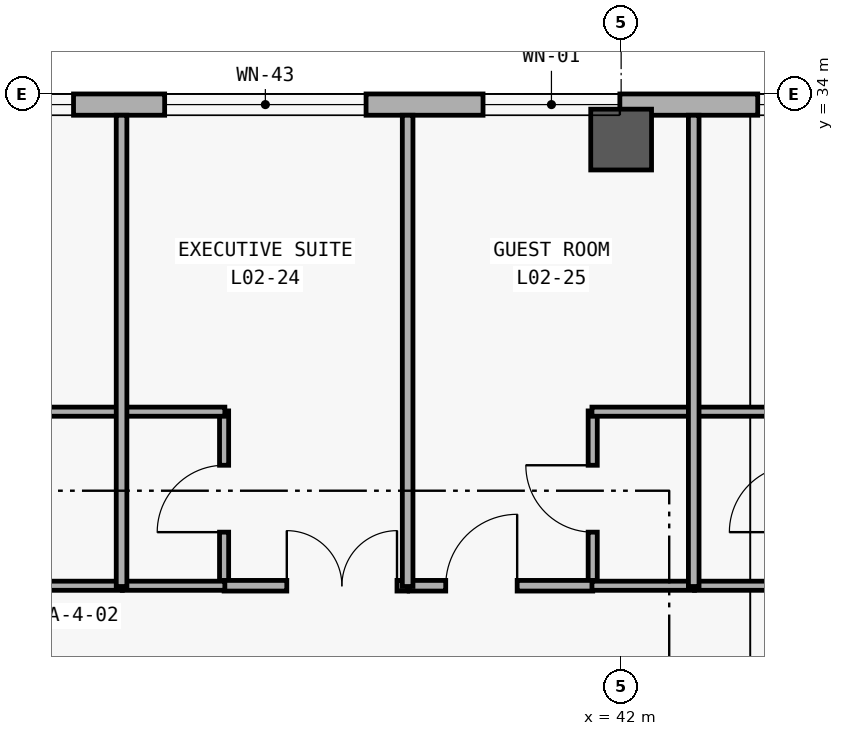
"""IFC4 building model, lengths in metres.
Left out: names, types, materials, properties, quantities, classifications, styles, units other than length and angle.
Written with IfcOpenShell. Run it as: python <this file> out.ifc"""

import sys

from ifc_helpers import new_model, si_unit, direction, frame, frame_2d, origin, origin_2d, place, context, subcontext, project, spatial, rectangle, extrude, element, fill, save


model = new_model("IFC4")
c1 = context("Model", 3, precision=1e-05, world=origin(), true_north=direction((0.0, 1.0)))
c2 = subcontext(c1, "Body", "Model", "MODEL_VIEW")
j1 = project(units=[si_unit("LENGTHUNIT", "METRE"), si_unit("PLANEANGLEUNIT", "RADIAN")], contexts=[c1])
p1 = place(None, origin())
s1 = spatial("IfcSite", under=j1, at=p1, CompositionType="ELEMENT")
p2 = place(p1, origin())
s2 = spatial("IfcBuilding", under=s1, at=p2, CompositionType="ELEMENT")
p3 = place(p2, frame((0.0, 0.0, 10.8)))
s3 = spatial("IfcBuildingStorey", under=s2, at=p3, CompositionType="ELEMENT", Elevation=10.8)
p4 = place(p3, frame((42.0, 33.4, 0.0), z_axis=(0.0, 0.0, 1.0), x_axis=(1.0, 0.0, 0.0)))
e1 = element("IfcColumn", 1, at=p4, inside=s3, PredefinedType="COLUMN", context=c2, shape_type="SweptSolid", body=[
    extrude(rectangle(XDim=0.8, YDim=0.8, at=origin_2d()), origin(), (0.0, 0.0, 1.0), 4.2),
])
p5 = place(p3, frame((8.68, 33.86, 0.0), z_axis=(0.0, 0.0, 1.0), x_axis=(1.0, 0.0, 0.0)))
e2 = element("IfcWall", 2, at=p5, inside=s3, PredefinedType="SOLIDWALL", context=c2, shape_type="SweptSolid", body=[
    extrude(rectangle(XDim=83.44, YDim=0.28, at=frame_2d((41.72, 0.0))), origin(), (0.0, 0.0, 1.0), 3.92),
])
p6 = place(p5, frame((5.07, 0.0, 0.85)))
e3 = element("IfcOpeningElement", 3, at=p6, cuts=e2, PredefinedType="OPENING", context=c2, shape_type="SweptSolid", body=[
    extrude(rectangle(XDim=1.7, YDim=2.0, at=frame_2d((0.85, 1.0))), frame((0.0, 0.15, 0.0), z_axis=(0.0, -1.0, 0.0), x_axis=(1.0, 0.0, 0.0)), (0.0, 0.0, 1.0), 0.3),
])
p7 = place(p5, frame((12.557, 0.0, 0.85)))
e4 = element("IfcOpeningElement", 4, at=p7, cuts=e2, PredefinedType="OPENING", context=c2, shape_type="SweptSolid", body=[
    extrude(rectangle(XDim=2.05, YDim=1.95, at=frame_2d((1.025, 0.975))), frame((0.0, 0.15, 0.0), z_axis=(0.0, -1.0, 0.0), x_axis=(1.0, 0.0, 0.0)), (0.0, 0.0, 1.0), 0.3),
])
p8 = place(p5, frame((16.256, 0.0, 0.85)))
e5 = element("IfcOpeningElement", 5, at=p8, cuts=e2, PredefinedType="OPENING", context=c2, shape_type="SweptSolid", body=[
    extrude(rectangle(XDim=2.18, YDim=1.95, at=frame_2d((1.09, 0.975))), frame((0.0, 0.15, 0.0), z_axis=(0.0, -1.0, 0.0), x_axis=(1.0, 0.0, 0.0)), (0.0, 0.0, 1.0), 0.3),
])
p9 = place(p5, frame((19.921, 0.0, 0.85)))
e6 = element("IfcOpeningElement", 6, at=p9, cuts=e2, PredefinedType="OPENING", context=c2, shape_type="SweptSolid", body=[
    extrude(rectangle(XDim=2.38, YDim=1.95, at=frame_2d((1.19, 0.975))), frame((0.0, 0.15, 0.0), z_axis=(0.0, -1.0, 0.0), x_axis=(1.0, 0.0, 0.0)), (0.0, 0.0, 1.0), 0.3),
])
p10 = place(p5, frame((23.635, 0.0, 0.85)))
e7 = element("IfcOpeningElement", 7, at=p10, cuts=e2, PredefinedType="OPENING", context=c2, shape_type="SweptSolid", body=[
    extrude(rectangle(XDim=2.48, YDim=2.0, at=frame_2d((1.24, 1.0))), frame((0.0, 0.15, 0.0), z_axis=(0.0, -1.0, 0.0), x_axis=(1.0, 0.0, 0.0)), (0.0, 0.0, 1.0), 0.3),
])
p11 = place(p5, frame((27.314, 0.0, 0.85)))
e8 = element("IfcOpeningElement", 8, at=p11, cuts=e2, PredefinedType="OPENING", context=c2, shape_type="SweptSolid", body=[
    extrude(rectangle(XDim=2.65, YDim=2.0, at=frame_2d((1.325, 1.0))), frame((0.0, 0.15, 0.0), z_axis=(0.0, -1.0, 0.0), x_axis=(1.0, 0.0, 0.0)), (0.0, 0.0, 1.0), 0.3),
])
p12 = place(p5, frame((31.503, 0.0, 0.85)))
e9 = element("IfcOpeningElement", 9, at=p12, cuts=e2, PredefinedType="OPENING", context=c2, shape_type="SweptSolid", body=[
    extrude(rectangle(XDim=1.8, YDim=1.8, at=frame_2d((0.9, 0.9))), frame((0.0, 0.15, 0.0), z_axis=(0.0, -1.0, 0.0), x_axis=(1.0, 0.0, 0.0)), (0.0, 0.0, 1.0), 0.3),
])
p13 = place(p5, frame((35.117, 0.0, 0.85)))
e10 = element("IfcOpeningElement", 10, at=p13, cuts=e2, PredefinedType="OPENING", context=c2, shape_type="SweptSolid", body=[
    extrude(rectangle(XDim=2.1, YDim=1.8, at=frame_2d((1.05, 0.9))), frame((0.0, 0.15, 0.0), z_axis=(0.0, -1.0, 0.0), x_axis=(1.0, 0.0, 0.0)), (0.0, 0.0, 1.0), 0.3),
])
p14 = place(p5, frame((38.731, 0.0, 0.85)))
e11 = element("IfcOpeningElement", 11, at=p14, cuts=e2, PredefinedType="OPENING", context=c2, shape_type="SweptSolid", body=[
    extrude(rectangle(XDim=2.4, YDim=1.8, at=frame_2d((1.2, 0.9))), frame((0.0, 0.15, 0.0), z_axis=(0.0, -1.0, 0.0), x_axis=(1.0, 0.0, 0.0)), (0.0, 0.0, 1.0), 0.3),
])
p15 = place(p5, frame((42.346, 0.0, 0.85)))
e12 = element("IfcOpeningElement", 12, at=p15, cuts=e2, PredefinedType="OPENING", context=c2, shape_type="SweptSolid", body=[
    extrude(rectangle(XDim=2.7, YDim=1.85, at=frame_2d((1.35, 0.925))), frame((0.0, 0.15, 0.0), z_axis=(0.0, -1.0, 0.0), x_axis=(1.0, 0.0, 0.0)), (0.0, 0.0, 1.0), 0.3),
])
p16 = place(p5, frame((46.71, 0.0, 0.85)))
e13 = element("IfcOpeningElement", 13, at=p16, cuts=e2, PredefinedType="OPENING", context=c2, shape_type="SweptSolid", body=[
    extrude(rectangle(XDim=1.5, YDim=1.75, at=frame_2d((0.75, 0.875))), frame((0.0, 0.15, 0.0), z_axis=(0.0, -1.0, 0.0), x_axis=(1.0, 0.0, 0.0)), (0.0, 0.0, 1.0), 0.3),
])
p17 = place(p5, frame((50.399, 0.0, 0.85)))
e14 = element("IfcOpeningElement", 14, at=p17, cuts=e2, PredefinedType="OPENING", context=c2, shape_type="SweptSolid", body=[
    extrude(rectangle(XDim=1.65, YDim=1.75, at=frame_2d((0.825, 0.875))), frame((0.0, 0.15, 0.0), z_axis=(0.0, -1.0, 0.0), x_axis=(1.0, 0.0, 0.0)), (0.0, 0.0, 1.0), 0.3),
])
p18 = place(p5, frame((54.014, 0.0, 0.85)))
e15 = element("IfcOpeningElement", 15, at=p18, cuts=e2, PredefinedType="OPENING", context=c2, shape_type="SweptSolid", body=[
    extrude(rectangle(XDim=1.95, YDim=1.75, at=frame_2d((0.975, 0.875))), frame((0.0, 0.15, 0.0), z_axis=(0.0, -1.0, 0.0), x_axis=(1.0, 0.0, 0.0)), (0.0, 0.0, 1.0), 0.3),
])
p19 = place(p5, frame((57.628, 0.0, 0.85)))
e16 = element("IfcOpeningElement", 16, at=p19, cuts=e2, PredefinedType="OPENING", context=c2, shape_type="SweptSolid", body=[
    extrude(rectangle(XDim=2.25, YDim=1.75, at=frame_2d((1.125, 0.875))), frame((0.0, 0.15, 0.0), z_axis=(0.0, -1.0, 0.0), x_axis=(1.0, 0.0, 0.0)), (0.0, 0.0, 1.0), 0.3),
])
p20 = place(p5, frame((61.242, 0.0, 0.85)))
e17 = element("IfcOpeningElement", 17, at=p20, cuts=e2, PredefinedType="OPENING", context=c2, shape_type="SweptSolid", body=[
    extrude(rectangle(XDim=2.55, YDim=1.8, at=frame_2d((1.275, 0.9))), frame((0.0, 0.15, 0.0), z_axis=(0.0, -1.0, 0.0), x_axis=(1.0, 0.0, 0.0)), (0.0, 0.0, 1.0), 0.3),
])
p21 = place(p5, frame((64.856, 0.0, 0.85)))
e18 = element("IfcOpeningElement", 18, at=p21, cuts=e2, PredefinedType="OPENING", context=c2, shape_type="SweptSolid", body=[
    extrude(rectangle(XDim=2.85, YDim=1.85, at=frame_2d((1.425, 0.925))), frame((0.0, 0.15, 0.0), z_axis=(0.0, -1.0, 0.0), x_axis=(1.0, 0.0, 0.0)), (0.0, 0.0, 1.0), 0.3),
])
p22 = place(p5, frame((69.345, 0.0, 0.85)))
e19 = element("IfcOpeningElement", 19, at=p22, cuts=e2, PredefinedType="OPENING", context=c2, shape_type="SweptSolid", body=[
    extrude(rectangle(XDim=1.4, YDim=1.6, at=frame_2d((0.7, 0.8))), frame((0.0, 0.15, 0.0), z_axis=(0.0, -1.0, 0.0), x_axis=(1.0, 0.0, 0.0)), (0.0, 0.0, 1.0), 0.3),
])
p23 = place(p5, frame((73.009, 0.0, 0.85)))
e20 = element("IfcOpeningElement", 20, at=p23, cuts=e2, PredefinedType="OPENING", context=c2, shape_type="SweptSolid", body=[
    extrude(rectangle(XDim=1.6, YDim=1.6, at=frame_2d((0.8, 0.8))), frame((0.0, 0.15, 0.0), z_axis=(0.0, -1.0, 0.0), x_axis=(1.0, 0.0, 0.0)), (0.0, 0.0, 1.0), 0.3),
])
p24 = place(p5, frame((76.674, 0.0, 0.85)))
e21 = element("IfcOpeningElement", 21, at=p24, cuts=e2, PredefinedType="OPENING", context=c2, shape_type="SweptSolid", body=[
    extrude(rectangle(XDim=1.8, YDim=1.6, at=frame_2d((0.9, 0.8))), frame((0.0, 0.15, 0.0), z_axis=(0.0, -1.0, 0.0), x_axis=(1.0, 0.0, 0.0)), (0.0, 0.0, 1.0), 0.3),
])
p25 = place(p5, frame((80.338, 0.0, 0.85)))
e22 = element("IfcOpeningElement", 22, at=p25, cuts=e2, PredefinedType="OPENING", context=c2, shape_type="SweptSolid", body=[
    extrude(rectangle(XDim=2.0, YDim=1.65, at=frame_2d((1.0, 0.825))), frame((0.0, 0.15, 0.0), z_axis=(0.0, -1.0, 0.0), x_axis=(1.0, 0.0, 0.0)), (0.0, 0.0, 1.0), 0.3),
])
p26 = place(p3, frame((36.776, 27.52, 0.0), z_axis=(0.0, 0.0, 1.0), x_axis=(0.0, 1.0, 0.0)))
e23 = element("IfcWall", 23, at=p26, inside=s3, PredefinedType="PARTITIONING", context=c2, shape_type="SweptSolid", body=[
    extrude(rectangle(XDim=2.31, YDim=0.12, at=frame_2d((1.155, 0.0))), origin(), (0.0, 0.0, 1.0), 3.02),
])
p27 = place(p26, frame((0.715, 0.0, 0.0)))
e24 = element("IfcOpeningElement", 24, at=p27, cuts=e23, PredefinedType="OPENING", context=c2, shape_type="SweptSolid", body=[
    extrude(rectangle(XDim=0.88, YDim=2.15, at=frame_2d((0.44, 1.075))), frame((0.0, 0.07, 0.0), z_axis=(0.0, -1.0, 0.0), x_axis=(1.0, 0.0, 0.0)), (0.0, 0.0, 1.0), 0.14),
])
p28 = place(p3, frame((41.626, 27.52, 0.0), z_axis=(0.0, 0.0, 1.0), x_axis=(0.0, 1.0, 0.0)))
e25 = element("IfcWall", 25, at=p28, inside=s3, PredefinedType="PARTITIONING", context=c2, shape_type="SweptSolid", body=[
    extrude(rectangle(XDim=2.31, YDim=0.12, at=frame_2d((1.155, 0.0))), origin(), (0.0, 0.0, 1.0), 3.02),
])
p29 = place(p28, frame((0.715, 0.0, 0.0)))
e26 = element("IfcOpeningElement", 26, at=p29, cuts=e25, PredefinedType="OPENING", context=c2, shape_type="SweptSolid", body=[
    extrude(rectangle(XDim=0.88, YDim=2.15, at=frame_2d((0.44, 1.075))), frame((0.0, 0.07, 0.0), z_axis=(0.0, -1.0, 0.0), x_axis=(1.0, 0.0, 0.0)), (0.0, 0.0, 1.0), 0.14),
])
p30 = place(p3, frame((36.776, 27.53, 0.0), z_axis=(0.0, 0.0, 1.0), x_axis=(1.0, 0.0, 0.0)))
e27 = element("IfcWall", 27, at=p30, inside=s3, PredefinedType="PARTITIONING", context=c2, shape_type="SweptSolid", body=[
    extrude(rectangle(XDim=2.415, YDim=0.14, at=frame_2d((1.208, 0.0))), origin(), (0.0, 0.0, 1.0), 3.02),
])
p31 = place(p30, frame((0.825, 0.0, 0.0)))
e28 = element("IfcOpeningElement", 28, at=p31, cuts=e27, PredefinedType="OPENING", context=c2, shape_type="SweptSolid", body=[
    extrude(rectangle(XDim=1.45, YDim=2.3, at=frame_2d((0.725, 1.15))), frame((0.0, 0.08, 0.0), z_axis=(0.0, -1.0, 0.0), x_axis=(1.0, 0.0, 0.0)), (0.0, 0.0, 1.0), 0.16),
])
p32 = place(p3, frame((39.211, 27.53, 0.0), z_axis=(0.0, 0.0, 1.0), x_axis=(1.0, 0.0, 0.0)))
e29 = element("IfcWall", 29, at=p32, inside=s3, PredefinedType="PARTITIONING", context=c2, shape_type="SweptSolid", body=[
    extrude(rectangle(XDim=2.415, YDim=0.14, at=frame_2d((1.208, 0.0))), origin(), (0.0, 0.0, 1.0), 3.02),
])
p33 = place(p32, frame((0.481, 0.0, 0.0)))
e30 = element("IfcOpeningElement", 30, at=p33, cuts=e29, PredefinedType="OPENING", context=c2, shape_type="SweptSolid", body=[
    extrude(rectangle(XDim=0.94, YDim=2.2, at=frame_2d((0.47, 1.1))), frame((0.0, 0.08, 0.0), z_axis=(0.0, -1.0, 0.0), x_axis=(1.0, 0.0, 0.0)), (0.0, 0.0, 1.0), 0.16),
])
for number, where, z_axis, x_axis in (
    (31, (34.088, 27.53, 0.0), (0.0, 0.0, 1.0), (1.0, 0.0, 0.0)),
    (32, (34.088, 29.82, 0.0), (0.0, 0.0, 1.0), (1.0, 0.0, 0.0)),
):
    element("IfcWall", number, at=place(p3, frame(where, z_axis=z_axis, x_axis=x_axis)), inside=s3, PredefinedType="PARTITIONING", context=c2, shape_type="SweptSolid", body=[
        extrude(rectangle(XDim=1.349, YDim=0.12, at=frame_2d((0.675, 0.0))), origin(), (0.0, 0.0, 1.0), 3.02),
    ])
for number, where, z_axis, x_axis in (
    (33, (35.437, 27.53, 0.0), (0.0, 0.0, 1.0), (1.0, 0.0, 0.0)),
    (34, (35.437, 29.82, 0.0), (0.0, 0.0, 1.0), (1.0, 0.0, 0.0)),
):
    element("IfcWall", number, at=place(p3, frame(where, z_axis=z_axis, x_axis=x_axis)), inside=s3, PredefinedType="PARTITIONING", context=c2, shape_type="SweptSolid", body=[
        extrude(rectangle(XDim=1.349, YDim=0.12, at=frame_2d((0.674, 0.0))), origin(), (0.0, 0.0, 1.0), 3.02),
    ])
for number, where, z_axis, x_axis in (
    (35, (41.616, 27.53, 0.0), (0.0, 0.0, 1.0), (1.0, 0.0, 0.0)),
    (36, (41.616, 29.82, 0.0), (0.0, 0.0, 1.0), (1.0, 0.0, 0.0)),
):
    element("IfcWall", number, at=place(p3, frame(where, z_axis=z_axis, x_axis=x_axis)), inside=s3, PredefinedType="PARTITIONING", context=c2, shape_type="SweptSolid", body=[
        extrude(rectangle(XDim=1.349, YDim=0.12, at=frame_2d((0.675, 0.0))), origin(), (0.0, 0.0, 1.0), 3.02),
    ])
for number, where, z_axis, x_axis in (
    (37, (42.965, 27.53, 0.0), (0.0, 0.0, 1.0), (1.0, 0.0, 0.0)),
    (38, (42.965, 29.82, 0.0), (0.0, 0.0, 1.0), (1.0, 0.0, 0.0)),
):
    element("IfcWall", number, at=place(p3, frame(where, z_axis=z_axis, x_axis=x_axis)), inside=s3, PredefinedType="PARTITIONING", context=c2, shape_type="SweptSolid", body=[
        extrude(rectangle(XDim=1.349, YDim=0.12, at=frame_2d((0.674, 0.0))), origin(), (0.0, 0.0, 1.0), 3.02),
    ])
for number, where, z_axis, x_axis in (
    (39, (35.427, 27.52, 0.0), (0.0, 0.0, 1.0), (0.0, 1.0, 0.0)),
    (40, (39.191, 27.52, 0.0), (0.0, 0.0, 1.0), (0.0, 1.0, 0.0)),
    (41, (42.955, 27.52, 0.0), (0.0, 0.0, 1.0), (0.0, 1.0, 0.0)),
):
    element("IfcWall", number, at=place(p3, frame(where, z_axis=z_axis, x_axis=x_axis)), inside=s3, PredefinedType="PARTITIONING", context=c2, shape_type="SweptSolid", body=[
        extrude(rectangle(XDim=6.2, YDim=0.14, at=frame_2d((3.1, 0.0))), origin(), (0.0, 0.0, 1.0), 3.02),
    ])
p34 = place(p10, origin())
e42 = element("IfcWindow", 42, at=p34, inside=s3, PartitioningType="SINGLE_PANEL", PredefinedType="WINDOW", context=c2, shape_type="SweptSolid", body=[
    extrude(rectangle(XDim=2.48, YDim=2.0, at=frame_2d((1.24, 1.0))), frame((0.0, 0.03, 0.0), z_axis=(0.0, -1.0, 0.0), x_axis=(1.0, 0.0, 0.0)), (0.0, 0.0, 1.0), 0.06),
])
fill(e7, e42)
p35 = place(p11, origin())
e43 = element("IfcWindow", 43, at=p35, inside=s3, PartitioningType="SINGLE_PANEL", PredefinedType="WINDOW", context=c2, shape_type="SweptSolid", body=[
    extrude(rectangle(XDim=2.65, YDim=2.0, at=frame_2d((1.325, 1.0))), frame((0.0, 0.03, 0.0), z_axis=(0.0, -1.0, 0.0), x_axis=(1.0, 0.0, 0.0)), (0.0, 0.0, 1.0), 0.06),
])
fill(e8, e43)
p36 = place(p12, origin())
e44 = element("IfcWindow", 44, at=p36, inside=s3, PartitioningType="SINGLE_PANEL", PredefinedType="WINDOW", context=c2, shape_type="SweptSolid", body=[
    extrude(rectangle(XDim=1.8, YDim=1.8, at=frame_2d((0.9, 0.9))), frame((0.0, 0.03, 0.0), z_axis=(0.0, -1.0, 0.0), x_axis=(1.0, 0.0, 0.0)), (0.0, 0.0, 1.0), 0.06),
])
fill(e9, e44)
p37 = place(p13, origin())
e45 = element("IfcWindow", 45, at=p37, inside=s3, PartitioningType="SINGLE_PANEL", PredefinedType="WINDOW", context=c2, shape_type="SweptSolid", body=[
    extrude(rectangle(XDim=2.1, YDim=1.8, at=frame_2d((1.05, 0.9))), frame((0.0, 0.03, 0.0), z_axis=(0.0, -1.0, 0.0), x_axis=(1.0, 0.0, 0.0)), (0.0, 0.0, 1.0), 0.06),
])
fill(e10, e45)
p38 = place(p27, origin())
e46 = element("IfcDoor", 46, at=p38, inside=s3, OperationType="SINGLE_SWING_LEFT", PredefinedType="DOOR", context=c2, shape_type="SweptSolid", body=[
    extrude(rectangle(XDim=0.88, YDim=2.15, at=frame_2d((0.44, 1.075))), frame((0.0, 0.025, 0.0), z_axis=(0.0, -1.0, 0.0), x_axis=(1.0, 0.0, 0.0)), (0.0, 0.0, 1.0), 0.05),
])
fill(e24, e46)
p39 = place(p29, origin())
e47 = element("IfcDoor", 47, at=p39, inside=s3, OperationType="SINGLE_SWING_RIGHT", PredefinedType="DOOR", context=c2, shape_type="SweptSolid", body=[
    extrude(rectangle(XDim=0.88, YDim=2.15, at=frame_2d((0.44, 1.075))), frame((0.0, 0.025, 0.0), z_axis=(0.0, -1.0, 0.0), x_axis=(1.0, 0.0, 0.0)), (0.0, 0.0, 1.0), 0.05),
])
fill(e26, e47)
p40 = place(p31, origin())
e48 = element("IfcDoor", 48, at=p40, inside=s3, OperationType="DOUBLE_DOOR_SINGLE_SWING", PredefinedType="DOOR", context=c2, shape_type="SweptSolid", body=[
    extrude(rectangle(XDim=1.45, YDim=2.3, at=frame_2d((0.725, 1.15))), frame((0.0, 0.025, 0.0), z_axis=(0.0, -1.0, 0.0), x_axis=(1.0, 0.0, 0.0)), (0.0, 0.0, 1.0), 0.05),
])
fill(e28, e48)
p41 = place(p33, origin())
e49 = element("IfcDoor", 49, at=p41, inside=s3, OperationType="SINGLE_SWING_RIGHT", PredefinedType="DOOR", context=c2, shape_type="SweptSolid", body=[
    extrude(rectangle(XDim=0.94, YDim=2.2, at=frame_2d((0.47, 1.1))), frame((0.0, 0.025, 0.0), z_axis=(0.0, -1.0, 0.0), x_axis=(1.0, 0.0, 0.0)), (0.0, 0.0, 1.0), 0.05),
])
fill(e30, e49)
save(model, sys.argv[1])
